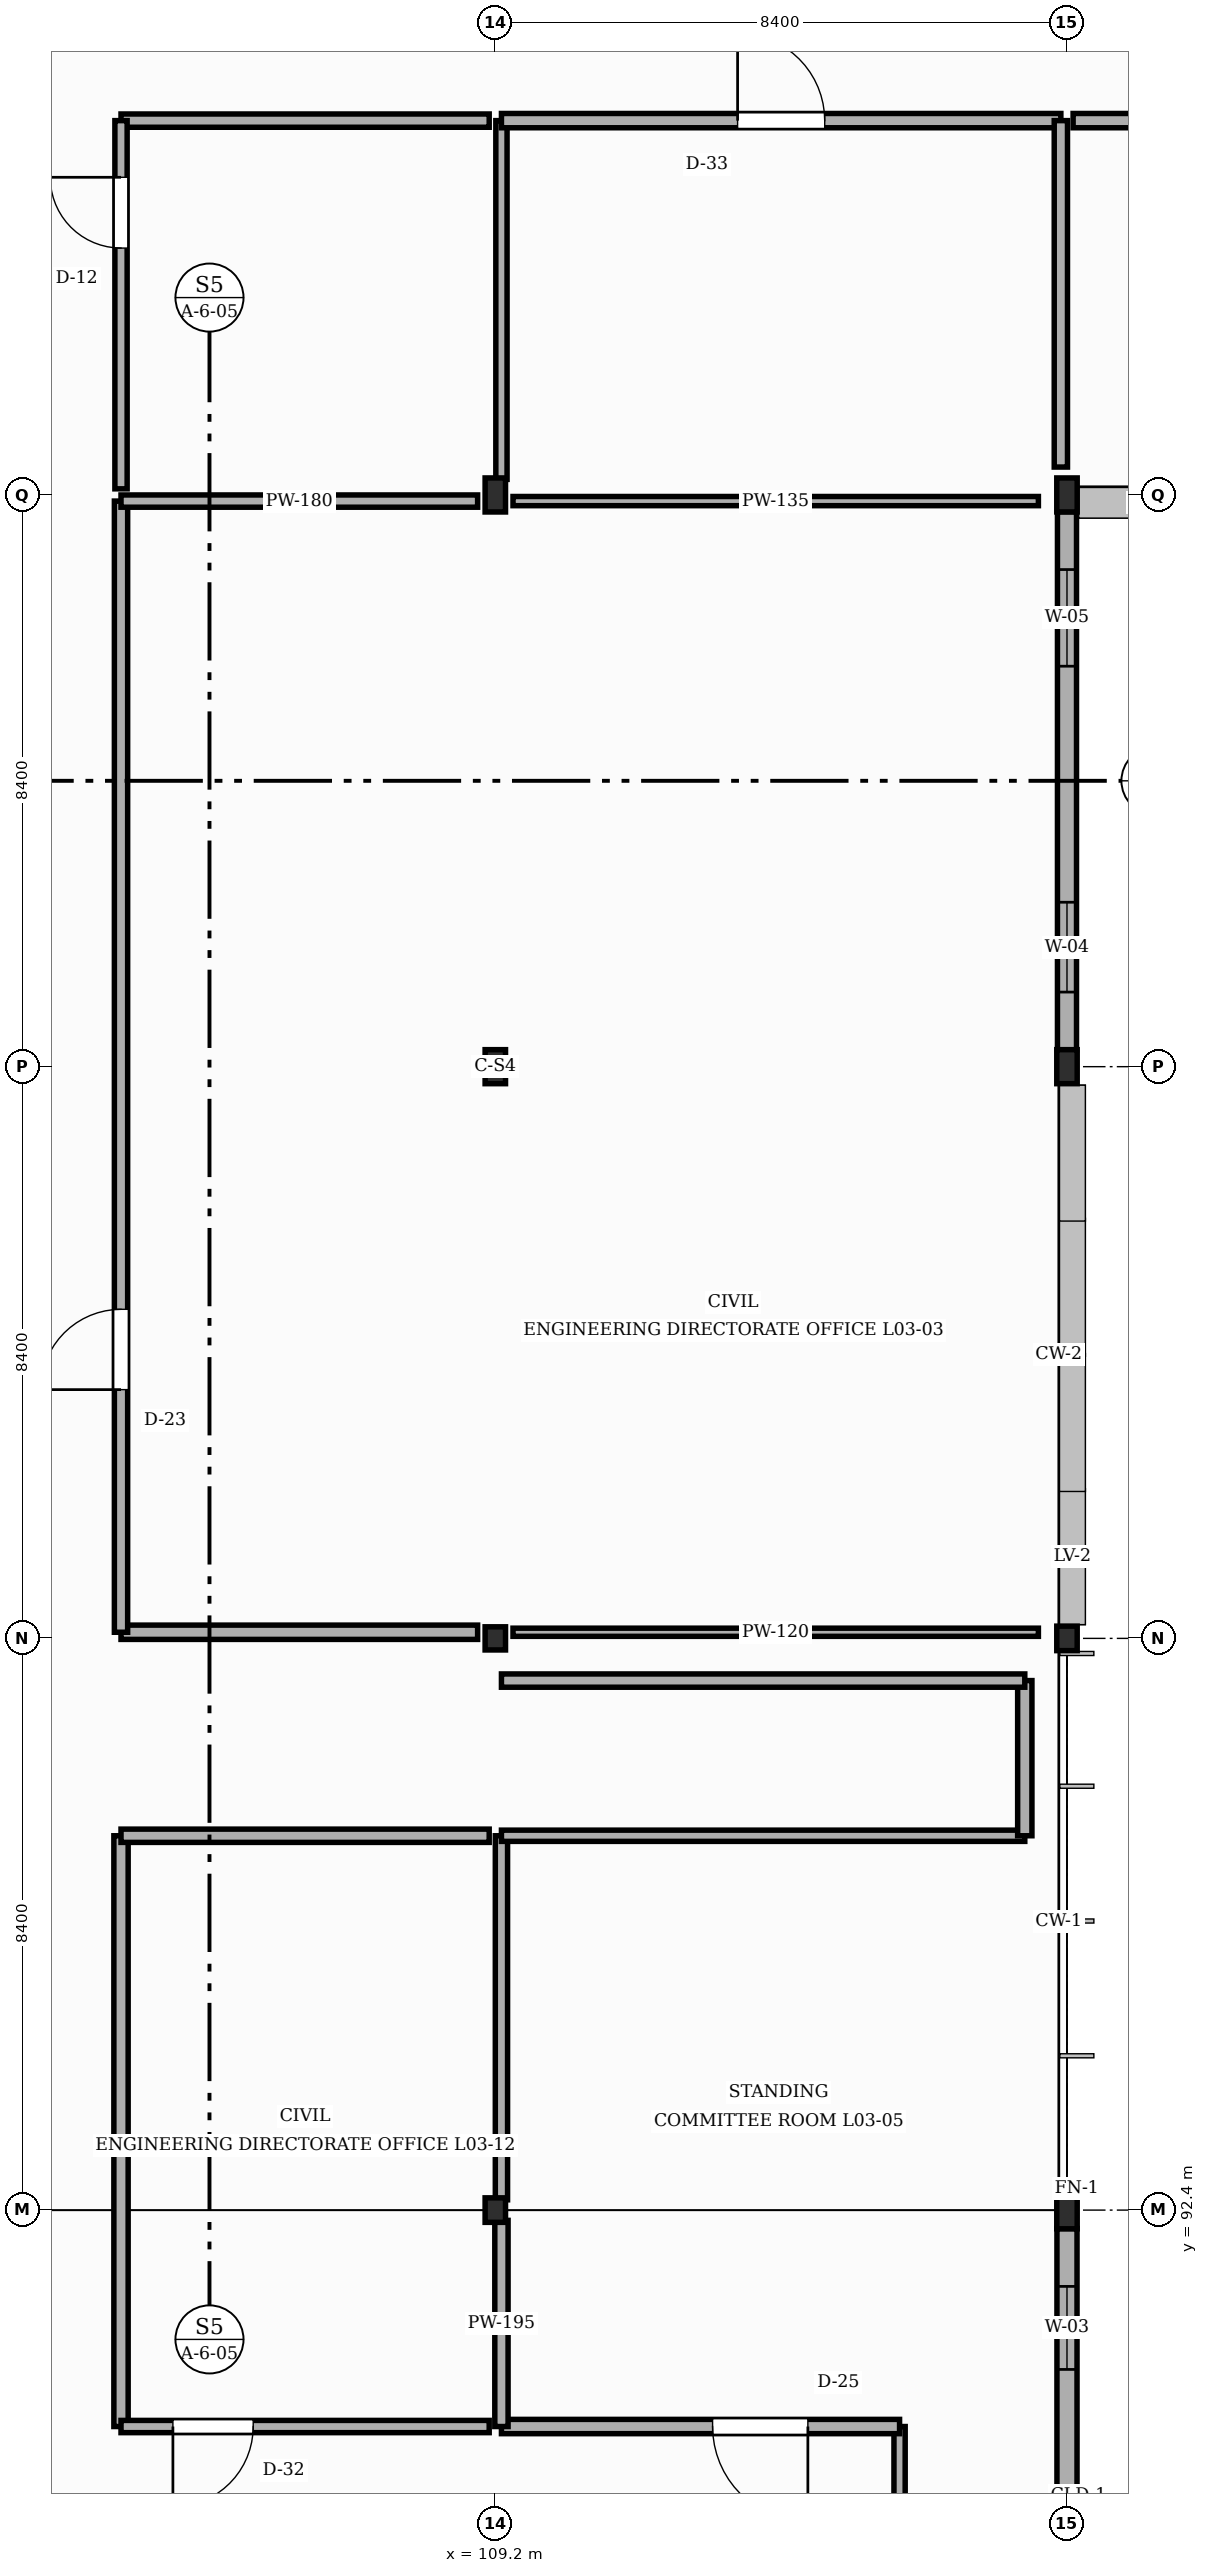
"""IFC4 building model, lengths in metres.
Left out: names, types, materials, properties, quantities, classifications, styles, units other than length and angle.
Written with IfcOpenShell. Run it as: python <this file> out.ifc"""

import sys

from ifc_helpers import new_model, si_unit, direction, frame, frame_2d, origin, origin_2d, place, context, subcontext, project, spatial, rectangle, i_section, extrude, element, fill, save


model = new_model("IFC4")
c1 = context("Model", 3, precision=1e-05, world=origin(), true_north=direction((0.0, 1.0)))
c2 = subcontext(c1, "Body", "Model", "MODEL_VIEW")
j1 = project(units=[si_unit("LENGTHUNIT", "METRE"), si_unit("PLANEANGLEUNIT", "RADIAN")], contexts=[c1])
p1 = place(None, origin())
s1 = spatial("IfcSite", under=j1, at=p1, CompositionType="ELEMENT")
p2 = place(p1, origin())
s2 = spatial("IfcBuilding", under=s1, at=p2, CompositionType="ELEMENT")
p3 = place(p2, frame((0.0, 0.0, 13.95)))
s3 = spatial("IfcBuildingStorey", under=s2, at=p3, CompositionType="ELEMENT", Elevation=13.95)
p4 = place(p3, frame((109.2, 92.4, 0.0), z_axis=(0.0, 0.0, 1.0), x_axis=(1.0, 0.0, 0.0)))
e1 = element("IfcColumn", 1, at=p4, inside=s3, PredefinedType="COLUMN", context=c2, shape_type="SweptSolid", body=[
    extrude(i_section(OverallWidth=0.3, OverallDepth=0.36, WebThickness=0.012, FlangeThickness=0.022, FilletRadius=0.027, at=origin_2d()), origin(), (0.0, 0.0, 1.0), 4.05),
])
p5 = place(p3, frame((109.2, 100.8, 0.0), z_axis=(0.0, 0.0, 1.0), x_axis=(1.0, 0.0, 0.0)))
e2 = element("IfcColumn", 2, at=p5, inside=s3, PredefinedType="COLUMN", context=c2, shape_type="SweptSolid", body=[
    extrude(i_section(OverallWidth=0.3, OverallDepth=0.34, WebThickness=0.012, FlangeThickness=0.021, FilletRadius=0.027, at=origin_2d()), origin(), (0.0, 0.0, 1.0), 4.05),
])
for number, where, z_axis, x_axis in (
    (3, (109.2, 109.2, 0.0), (0.0, 0.0, 1.0), (1.0, 0.0, 0.0)),
    (4, (109.2, 117.6, 0.0), (0.0, 0.0, 1.0), (1.0, 0.0, 0.0)),
):
    element("IfcColumn", number, at=place(p3, frame(where, z_axis=z_axis, x_axis=x_axis)), inside=s3, PredefinedType="COLUMN", context=c2, shape_type="SweptSolid", body=[
        extrude(i_section(OverallWidth=0.3, OverallDepth=0.5, WebThickness=0.014, FlangeThickness=0.028, FilletRadius=0.027, at=origin_2d()), origin(), (0.0, 0.0, 1.0), 4.05),
    ])
p6 = place(p3, frame((117.6, 92.4, 0.0), z_axis=(0.0, 0.0, 1.0), x_axis=(1.0, 0.0, 0.0)))
e5 = element("IfcColumn", 5, at=p6, inside=s3, PredefinedType="COLUMN", context=c2, shape_type="SweptSolid", body=[
    extrude(i_section(OverallWidth=0.3, OverallDepth=0.55, WebThickness=0.015, FlangeThickness=0.029, FilletRadius=0.027, at=origin_2d()), origin(), (0.0, 0.0, 1.0), 4.05),
])
p7 = place(p3, frame((117.6, 100.8, 0.0), z_axis=(0.0, 0.0, 1.0), x_axis=(1.0, 0.0, 0.0)))
e6 = element("IfcColumn", 6, at=p7, inside=s3, PredefinedType="COLUMN", context=c2, shape_type="SweptSolid", body=[
    extrude(i_section(OverallWidth=0.3, OverallDepth=0.36, WebThickness=0.012, FlangeThickness=0.022, FilletRadius=0.027, at=origin_2d()), origin(), (0.0, 0.0, 1.0), 4.05),
])
for number, where, z_axis, x_axis in (
    (7, (117.6, 109.2, 0.0), (0.0, 0.0, 1.0), (1.0, 0.0, 0.0)),
    (8, (117.6, 117.6, 0.0), (0.0, 0.0, 1.0), (1.0, 0.0, 0.0)),
):
    element("IfcColumn", number, at=place(p3, frame(where, z_axis=z_axis, x_axis=x_axis)), inside=s3, PredefinedType="COLUMN", context=c2, shape_type="SweptSolid", body=[
        extrude(i_section(OverallWidth=0.3, OverallDepth=0.5, WebThickness=0.014, FlangeThickness=0.028, FilletRadius=0.027, at=origin_2d()), origin(), (0.0, 0.0, 1.0), 4.05),
    ])
p8 = place(p3, frame((117.6, 84.271, 0.0), z_axis=(0.0, 0.0, 1.0), x_axis=(0.0, 1.0, 0.0)))
e9 = element("IfcWall", 9, at=p8, inside=s3, PredefinedType="STANDARD", context=c2, shape_type="SweptSolid", body=[
    extrude(rectangle(XDim=7.858, YDim=0.295, at=frame_2d((3.929, 0.0))), origin(), (0.0, 0.0, 1.0), 3.487),
])
p9 = place(p8, frame((0.85, 0.0, 0.9)))
e10 = element("IfcOpeningElement", 10, at=p9, cuts=e9, PredefinedType="OPENING", context=c2, shape_type="SweptSolid", body=[
    extrude(rectangle(XDim=1.12, YDim=1.05, at=frame_2d((0.56, 0.525))), frame((0.0, 0.157, 0.0), z_axis=(0.0, -1.0, 0.0), x_axis=(1.0, 0.0, 0.0)), (0.0, 0.0, 1.0), 0.315),
])
p10 = place(p8, frame((5.788, 0.0, 0.9)))
e11 = element("IfcOpeningElement", 11, at=p10, cuts=e9, PredefinedType="OPENING", context=c2, shape_type="SweptSolid", body=[
    extrude(rectangle(XDim=1.22, YDim=1.05, at=frame_2d((0.61, 0.525))), frame((0.0, 0.157, 0.0), z_axis=(0.0, -1.0, 0.0), x_axis=(1.0, 0.0, 0.0)), (0.0, 0.0, 1.0), 0.315),
])
p11 = place(p3, frame((117.6, 109.446, 0.0), z_axis=(0.0, 0.0, 1.0), x_axis=(0.0, 1.0, 0.0)))
e12 = element("IfcWall", 12, at=p11, inside=s3, PredefinedType="STANDARD", context=c2, shape_type="SweptSolid", body=[
    extrude(rectangle(XDim=7.908, YDim=0.28, at=frame_2d((3.954, 0.0))), origin(), (0.0, 0.0, 1.0), 3.577),
])
p12 = place(p11, frame((0.85, 0.0, 0.9)))
e13 = element("IfcOpeningElement", 13, at=p12, cuts=e12, PredefinedType="OPENING", context=c2, shape_type="SweptSolid", body=[
    extrude(rectangle(XDim=1.32, YDim=1.05, at=frame_2d((0.66, 0.525))), frame((0.0, 0.15, 0.0), z_axis=(0.0, -1.0, 0.0), x_axis=(1.0, 0.0, 0.0)), (0.0, 0.0, 1.0), 0.3),
])
p13 = place(p11, frame((5.638, 0.0, 0.9)))
e14 = element("IfcOpeningElement", 14, at=p13, cuts=e12, PredefinedType="OPENING", context=c2, shape_type="SweptSolid", body=[
    extrude(rectangle(XDim=1.42, YDim=1.05, at=frame_2d((0.71, 0.525))), frame((0.0, 0.15, 0.0), z_axis=(0.0, -1.0, 0.0), x_axis=(1.0, 0.0, 0.0)), (0.0, 0.0, 1.0), 0.3),
])
p14 = place(p3, frame((109.46, 117.51, -0.004), z_axis=(0.0, 0.0, 1.0), x_axis=(1.0, 0.0, 0.0)))
e15 = element("IfcWall", 15, at=p14, inside=s3, PredefinedType="STANDARD", context=c2, shape_type="SweptSolid", body=[
    extrude(rectangle(XDim=7.72, YDim=0.135, at=frame_2d((3.86, 0.0))), origin(), (0.0, 0.0, 1.0), 3.251),
])
p15 = place(p3, frame((117.18, 100.89, -0.004), z_axis=(0.0, 0.0, 1.0), x_axis=(-1.0, 0.0, 0.0)))
e16 = element("IfcWall", 16, at=p15, inside=s3, PredefinedType="STANDARD", context=c2, shape_type="SweptSolid", body=[
    extrude(rectangle(XDim=7.72, YDim=0.12, at=frame_2d((3.86, 0.0))), origin(), (0.0, 0.0, 1.0), 3.301),
])
p16 = place(p3, frame((108.94, 100.89, -0.004), z_axis=(0.0, 0.0, 1.0), x_axis=(-1.0, 0.0, 0.0)))
e17 = element("IfcWall", 17, at=p16, inside=s3, PredefinedType="STANDARD", context=c2, shape_type="SweptSolid", body=[
    extrude(rectangle(XDim=5.24, YDim=0.21, at=frame_2d((2.62, 0.0))), origin(), (0.0, 0.0, 1.0), 3.461),
])
p17 = place(p3, frame((103.7, 100.89, -0.004), z_axis=(0.0, 0.0, 1.0), x_axis=(0.0, 1.0, 0.0)))
e18 = element("IfcWall", 18, at=p17, inside=s3, PredefinedType="STANDARD", context=c2, shape_type="SweptSolid", body=[
    extrude(rectangle(XDim=16.62, YDim=0.195, at=frame_2d((8.31, 0.0))), origin(), (0.0, 0.0, 1.0), 3.581),
])
p18 = place(p17, frame((3.565, 0.0, 0.0)))
e19 = element("IfcOpeningElement", 19, at=p18, cuts=e18, PredefinedType="OPENING", context=c2, shape_type="SweptSolid", body=[
    extrude(rectangle(XDim=1.18, YDim=2.22, at=frame_2d((0.59, 1.11))), frame((0.0, 0.107, 0.0), z_axis=(0.0, -1.0, 0.0), x_axis=(1.0, 0.0, 0.0)), (0.0, 0.0, 1.0), 0.215),
])
p19 = place(p3, frame((103.7, 117.51, -0.004), z_axis=(0.0, 0.0, 1.0), x_axis=(1.0, 0.0, 0.0)))
e20 = element("IfcWall", 20, at=p19, inside=s3, PredefinedType="STANDARD", context=c2, shape_type="SweptSolid", body=[
    extrude(rectangle(XDim=5.24, YDim=0.18, at=frame_2d((2.62, 0.0))), origin(), (0.0, 0.0, 1.0), 3.351),
])
p20 = place(p3, frame((115.14, 84.09, -0.004), z_axis=(0.0, 0.0, 1.0), x_axis=(0.0, 1.0, 0.0)))
e21 = element("IfcWall", 21, at=p20, inside=s3, PredefinedType="STANDARD", context=c2, shape_type="SweptSolid", body=[
    extrude(rectangle(XDim=5.13, YDim=0.165, at=frame_2d((2.565, 0.0))), origin(), (0.0, 0.0, 1.0), 3.551),
])
p21 = place(p3, frame((115.14, 89.22, -0.004), z_axis=(0.0, 0.0, 1.0), x_axis=(-1.0, 0.0, 0.0)))
e22 = element("IfcWall", 22, at=p21, inside=s3, PredefinedType="STANDARD", context=c2, shape_type="SweptSolid", body=[
    extrude(rectangle(XDim=5.85, YDim=0.21, at=frame_2d((2.925, 0.0))), origin(), (0.0, 0.0, 1.0), 3.854),
])
p22 = place(p21, frame((1.347, 0.0, 0.0)))
e23 = element("IfcOpeningElement", 23, at=p22, cuts=e22, PredefinedType="OPENING", context=c2, shape_type="SweptSolid", body=[
    extrude(rectangle(XDim=1.4, YDim=2.22, at=frame_2d((0.7, 1.11))), frame((0.0, 0.115, 0.0), z_axis=(0.0, -1.0, 0.0), x_axis=(1.0, 0.0, 0.0)), (0.0, 0.0, 1.0), 0.23),
])
p23 = place(p3, frame((109.29, 89.22, -0.004), z_axis=(0.0, 0.0, 1.0), x_axis=(0.0, 1.0, 0.0)))
e24 = element("IfcWall", 24, at=p23, inside=s3, PredefinedType="STANDARD", context=c2, shape_type="SweptSolid", body=[
    extrude(rectangle(XDim=3.029, YDim=0.195, at=frame_2d((1.515, 0.0))), origin(), (0.0, 0.0, 1.0), 3.854),
])
p24 = place(p3, frame((109.29, 92.551, -0.004), z_axis=(0.0, 0.0, 1.0), x_axis=(0.0, 1.0, 0.0)))
e25 = element("IfcWall", 25, at=p24, inside=s3, PredefinedType="STANDARD", context=c2, shape_type="SweptSolid", body=[
    extrude(rectangle(XDim=5.349, YDim=0.18, at=frame_2d((2.674, 0.0))), origin(), (0.0, 0.0, 1.0), 3.541),
])
p25 = place(p3, frame((109.29, 97.9, -0.004), z_axis=(0.0, 0.0, 1.0), x_axis=(1.0, 0.0, 0.0)))
e26 = element("IfcWall", 26, at=p25, inside=s3, PredefinedType="STANDARD", context=c2, shape_type="SweptSolid", body=[
    extrude(rectangle(XDim=7.69, YDim=0.165, at=frame_2d((3.845, 0.0))), origin(), (0.0, 0.0, 1.0), 3.854),
])
p26 = place(p3, frame((116.98, 97.9, -0.004), z_axis=(0.0, 0.0, 1.0), x_axis=(0.0, 1.0, 0.0)))
e27 = element("IfcWall", 27, at=p26, inside=s3, PredefinedType="STANDARD", context=c2, shape_type="SweptSolid", body=[
    extrude(rectangle(XDim=2.28, YDim=0.21, at=frame_2d((1.14, 0.0))), origin(), (0.0, 0.0, 1.0), 3.854),
])
p27 = place(p3, frame((116.98, 100.18, -0.004), z_axis=(0.0, 0.0, 1.0), x_axis=(-1.0, 0.0, 0.0)))
e28 = element("IfcWall", 28, at=p27, inside=s3, PredefinedType="STANDARD", context=c2, shape_type="SweptSolid", body=[
    extrude(rectangle(XDim=7.69, YDim=0.195, at=frame_2d((3.845, 0.0))), origin(), (0.0, 0.0, 1.0), 3.854),
])
p28 = place(p3, frame((103.7, 89.22, -0.004), z_axis=(0.0, 0.0, 1.0), x_axis=(0.0, 1.0, 0.0)))
e29 = element("IfcWall", 29, at=p28, inside=s3, PredefinedType="STANDARD", context=c2, shape_type="SweptSolid", body=[
    extrude(rectangle(XDim=8.68, YDim=0.21, at=frame_2d((4.34, 0.0))), origin(), (0.0, 0.0, 1.0), 3.551),
])
p29 = place(p3, frame((103.7, 97.9, -0.004), z_axis=(0.0, 0.0, 1.0), x_axis=(1.0, 0.0, 0.0)))
e30 = element("IfcWall", 30, at=p29, inside=s3, PredefinedType="STANDARD", context=c2, shape_type="SweptSolid", body=[
    extrude(rectangle(XDim=5.41, YDim=0.195, at=frame_2d((2.705, 0.0))), origin(), (0.0, 0.0, 1.0), 3.854),
])
p30 = place(p3, frame((109.11, 89.22, -0.004), z_axis=(0.0, 0.0, 1.0), x_axis=(-1.0, 0.0, 0.0)))
e31 = element("IfcWall", 31, at=p30, inside=s3, PredefinedType="STANDARD", context=c2, shape_type="SweptSolid", body=[
    extrude(rectangle(XDim=5.41, YDim=0.18, at=frame_2d((2.705, 0.0))), origin(), (0.0, 0.0, 1.0), 3.854),
])
p31 = place(p30, frame((3.468, 0.0, 0.0)))
e32 = element("IfcOpeningElement", 32, at=p31, cuts=e31, PredefinedType="OPENING", context=c2, shape_type="SweptSolid", body=[
    extrude(rectangle(XDim=1.18, YDim=2.3, at=frame_2d((0.59, 1.15))), frame((0.0, 0.1, 0.0), z_axis=(0.0, -1.0, 0.0), x_axis=(1.0, 0.0, 0.0)), (0.0, 0.0, 1.0), 0.2),
])
p32 = place(p3, frame((109.29, 117.829, -0.004), z_axis=(0.0, 0.0, 1.0), x_axis=(0.0, 1.0, 0.0)))
e33 = element("IfcWall", 33, at=p32, inside=s3, PredefinedType="STANDARD", context=c2, shape_type="SweptSolid", body=[
    extrude(rectangle(XDim=5.271, YDim=0.165, at=frame_2d((2.636, 0.0))), origin(), (0.0, 0.0, 1.0), 3.451),
])
p33 = place(p3, frame((109.29, 123.1, -0.004), z_axis=(0.0, 0.0, 1.0), x_axis=(1.0, 0.0, 0.0)))
e34 = element("IfcWall", 34, at=p33, inside=s3, PredefinedType="STANDARD", context=c2, shape_type="SweptSolid", body=[
    extrude(rectangle(XDim=8.22, YDim=0.21, at=frame_2d((4.11, 0.0))), origin(), (0.0, 0.0, 1.0), 3.854),
])
p34 = place(p33, frame((3.47, 0.0, 0.0)))
e35 = element("IfcOpeningElement", 35, at=p34, cuts=e34, PredefinedType="OPENING", context=c2, shape_type="SweptSolid", body=[
    extrude(rectangle(XDim=1.28, YDim=2.3, at=frame_2d((0.64, 1.15))), frame((0.0, 0.115, 0.0), z_axis=(0.0, -1.0, 0.0), x_axis=(1.0, 0.0, 0.0)), (0.0, 0.0, 1.0), 0.23),
])
p35 = place(p3, frame((117.51, 123.1, -0.004), z_axis=(0.0, 0.0, 1.0), x_axis=(0.0, -1.0, 0.0)))
e36 = element("IfcWall", 36, at=p35, inside=s3, PredefinedType="STANDARD", context=c2, shape_type="SweptSolid", body=[
    extrude(rectangle(XDim=5.09, YDim=0.195, at=frame_2d((2.545, 0.0))), origin(), (0.0, 0.0, 1.0), 3.501),
])
p36 = place(p3, frame((117.69, 123.1, -0.004), z_axis=(0.0, 0.0, 1.0), x_axis=(1.0, 0.0, 0.0)))
e37 = element("IfcWall", 37, at=p36, inside=s3, PredefinedType="STANDARD", context=c2, shape_type="SweptSolid", body=[
    extrude(rectangle(XDim=8.22, YDim=0.21, at=frame_2d((4.11, 0.0))), origin(), (0.0, 0.0, 1.0), 3.854),
])
p37 = place(p36, frame((3.56, 0.0, 0.0)))
e38 = element("IfcOpeningElement", 38, at=p37, cuts=e37, PredefinedType="OPENING", context=c2, shape_type="SweptSolid", body=[
    extrude(rectangle(XDim=1.1, YDim=2.06, at=frame_2d((0.55, 1.03))), frame((0.0, 0.115, 0.0), z_axis=(0.0, -1.0, 0.0), x_axis=(1.0, 0.0, 0.0)), (0.0, 0.0, 1.0), 0.23),
])
p38 = place(p3, frame((103.7, 123.1, -0.004), z_axis=(0.0, 0.0, 1.0), x_axis=(1.0, 0.0, 0.0)))
e39 = element("IfcWall", 39, at=p38, inside=s3, PredefinedType="STANDARD", context=c2, shape_type="SweptSolid", body=[
    extrude(rectangle(XDim=5.41, YDim=0.195, at=frame_2d((2.705, 0.0))), origin(), (0.0, 0.0, 1.0), 3.854),
])
p39 = place(p3, frame((103.7, 117.69, -0.004), z_axis=(0.0, 0.0, 1.0), x_axis=(0.0, 1.0, 0.0)))
e40 = element("IfcWall", 40, at=p39, inside=s3, PredefinedType="STANDARD", context=c2, shape_type="SweptSolid", body=[
    extrude(rectangle(XDim=5.41, YDim=0.18, at=frame_2d((2.705, 0.0))), origin(), (0.0, 0.0, 1.0), 3.631),
])
p40 = place(p39, frame((3.538, 0.0, 0.0)))
e41 = element("IfcOpeningElement", 41, at=p40, cuts=e40, PredefinedType="OPENING", context=c2, shape_type="SweptSolid", body=[
    extrude(rectangle(XDim=1.04, YDim=2.14, at=frame_2d((0.52, 1.07))), frame((0.0, 0.1, 0.0), z_axis=(0.0, -1.0, 0.0), x_axis=(1.0, 0.0, 0.0)), (0.0, 0.0, 1.0), 0.2),
])
p41 = place(p10, origin())
e42 = element("IfcWindow", 42, at=p41, inside=s3, PartitioningType="SINGLE_PANEL", PredefinedType="WINDOW", context=c2, shape_type="SweptSolid", body=[
    extrude(rectangle(XDim=1.22, YDim=1.05, at=frame_2d((0.61, 0.525))), frame((0.0, 0.03, 0.0), z_axis=(0.0, -1.0, 0.0), x_axis=(1.0, 0.0, 0.0)), (0.0, 0.0, 1.0), 0.06),
])
fill(e11, e42)
p42 = place(p12, origin())
e43 = element("IfcWindow", 43, at=p42, inside=s3, PartitioningType="SINGLE_PANEL", PredefinedType="WINDOW", context=c2, shape_type="SweptSolid", body=[
    extrude(rectangle(XDim=1.32, YDim=1.05, at=frame_2d((0.66, 0.525))), frame((0.0, 0.03, 0.0), z_axis=(0.0, -1.0, 0.0), x_axis=(1.0, 0.0, 0.0)), (0.0, 0.0, 1.0), 0.06),
])
fill(e13, e43)
p43 = place(p13, origin())
e44 = element("IfcWindow", 44, at=p43, inside=s3, PartitioningType="SINGLE_PANEL", PredefinedType="WINDOW", context=c2, shape_type="SweptSolid", body=[
    extrude(rectangle(XDim=1.42, YDim=1.05, at=frame_2d((0.71, 0.525))), frame((0.0, 0.03, 0.0), z_axis=(0.0, -1.0, 0.0), x_axis=(1.0, 0.0, 0.0)), (0.0, 0.0, 1.0), 0.06),
])
fill(e14, e44)
p44 = place(p18, origin())
e45 = element("IfcDoor", 45, at=p44, inside=s3, OperationType="SINGLE_SWING_LEFT", PredefinedType="DOOR", context=c2, shape_type="SweptSolid", body=[
    extrude(rectangle(XDim=1.18, YDim=2.22, at=frame_2d((0.59, 1.11))), frame((0.0, 0.025, 0.0), z_axis=(0.0, -1.0, 0.0), x_axis=(1.0, 0.0, 0.0)), (0.0, 0.0, 1.0), 0.05),
])
fill(e19, e45)
p45 = place(p22, origin())
e46 = element("IfcDoor", 46, at=p45, inside=s3, OperationType="SINGLE_SWING_LEFT", PredefinedType="DOOR", context=c2, shape_type="SweptSolid", body=[
    extrude(rectangle(XDim=1.4, YDim=2.22, at=frame_2d((0.7, 1.11))), frame((0.0, 0.025, 0.0), z_axis=(0.0, -1.0, 0.0), x_axis=(1.0, 0.0, 0.0)), (0.0, 0.0, 1.0), 0.05),
])
fill(e23, e46)
p46 = place(p31, origin())
e47 = element("IfcDoor", 47, at=p46, inside=s3, OperationType="SINGLE_SWING_RIGHT", PredefinedType="DOOR", context=c2, shape_type="SweptSolid", body=[
    extrude(rectangle(XDim=1.18, YDim=2.3, at=frame_2d((0.59, 1.15))), frame((0.0, 0.025, 0.0), z_axis=(0.0, -1.0, 0.0), x_axis=(1.0, 0.0, 0.0)), (0.0, 0.0, 1.0), 0.05),
])
fill(e32, e47)
p47 = place(p34, origin())
e48 = element("IfcDoor", 48, at=p47, inside=s3, OperationType="SINGLE_SWING_LEFT", PredefinedType="DOOR", context=c2, shape_type="SweptSolid", body=[
    extrude(rectangle(XDim=1.28, YDim=2.3, at=frame_2d((0.64, 1.15))), frame((0.0, 0.025, 0.0), z_axis=(0.0, -1.0, 0.0), x_axis=(1.0, 0.0, 0.0)), (0.0, 0.0, 1.0), 0.05),
])
fill(e35, e48)
p48 = place(p40, origin())
e49 = element("IfcDoor", 49, at=p48, inside=s3, OperationType="SINGLE_SWING_RIGHT", PredefinedType="DOOR", context=c2, shape_type="SweptSolid", body=[
    extrude(rectangle(XDim=1.04, YDim=2.14, at=frame_2d((0.52, 1.07))), frame((0.0, 0.025, 0.0), z_axis=(0.0, -1.0, 0.0), x_axis=(1.0, 0.0, 0.0)), (0.0, 0.0, 1.0), 0.05),
])
fill(e41, e49)
save(model, sys.argv[1])
